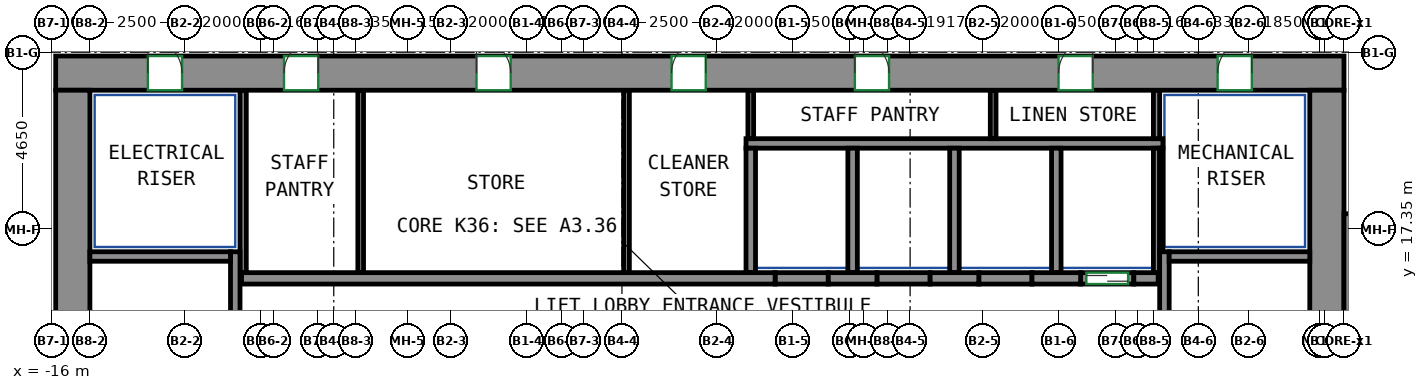
"""IFC4 building model, lengths in metres.
Left out: names, types, materials, properties, quantities, classifications, styles, units other than length and angle.
Written with IfcOpenShell. Run it as: python <this file> out.ifc"""

import sys

from ifc_helpers import new_model, si_unit, direction, frame, frame_2d, origin, place, context, subcontext, project, spatial, rectangle, extrude, source, transform, mapped, element, fill, save


model = new_model("IFC4")
c1 = context("Model", 3, precision=1e-05, world=origin(), true_north=direction((0.0, 1.0)))
c2 = subcontext(c1, "Body", "Model", "MODEL_VIEW")
j1 = project(units=[si_unit("LENGTHUNIT", "METRE"), si_unit("PLANEANGLEUNIT", "RADIAN")], contexts=[c1])
p1 = place(None, origin())
s1 = spatial("IfcSite", under=j1, at=p1, CompositionType="ELEMENT")
p2 = place(p1, origin())
s2 = spatial("IfcBuilding", under=s1, at=p2, CompositionType="ELEMENT")
p3 = place(p2, frame((0.0, 0.0, 154.1)))
s3 = spatial("IfcBuildingStorey", under=s2, at=p3, CompositionType="ELEMENT", Elevation=154.1)
m1 = source(origin(), c2, "Body", "SweptSolid", [
    extrude(rectangle(XDim=33.9, YDim=0.9, at=frame_2d((16.95, 0.0))), origin(), (0.0, 0.0, 1.0), 3.12),
])
p4 = place(p3, frame((-15.9, 21.45, 0.0), z_axis=(0.0, 0.0, 1.0), x_axis=(1.0, 0.0, 0.0)))
e1 = element("IfcWall", 1, at=p4, inside=s3, PredefinedType="SHEAR", context=c2, shape_type="MappedRepresentation", body=[
    mapped(m1, transform((0.0, 0.0, 0.0))),
])
p5 = place(p4, frame((6.008, 0.0, 0.0)))
e2 = element("IfcOpeningElement", 2, at=p5, cuts=e1, PredefinedType="OPENING", context=c2, shape_type="SweptSolid", body=[
    extrude(rectangle(XDim=0.9, YDim=2.1, at=frame_2d((0.45, 1.05))), frame((0.0, 0.46, 0.0), z_axis=(0.0, -1.0, 0.0), x_axis=(1.0, 0.0, 0.0)), (0.0, 0.0, 1.0), 0.92),
])
p6 = place(p4, frame((11.073, 0.0, 0.0)))
e3 = element("IfcOpeningElement", 3, at=p6, cuts=e1, PredefinedType="OPENING", context=c2, shape_type="SweptSolid", body=[
    extrude(rectangle(XDim=0.9, YDim=2.1, at=frame_2d((0.45, 1.05))), frame((0.0, 0.46, 0.0), z_axis=(0.0, -1.0, 0.0), x_axis=(1.0, 0.0, 0.0)), (0.0, 0.0, 1.0), 0.92),
])
p7 = place(p4, frame((16.205, 0.0, 0.0)))
e4 = element("IfcOpeningElement", 4, at=p7, cuts=e1, PredefinedType="OPENING", context=c2, shape_type="SweptSolid", body=[
    extrude(rectangle(XDim=0.9, YDim=2.1, at=frame_2d((0.45, 1.05))), frame((0.0, 0.46, 0.0), z_axis=(0.0, -1.0, 0.0), x_axis=(1.0, 0.0, 0.0)), (0.0, 0.0, 1.0), 0.92),
])
p8 = place(p4, frame((21.029, 0.0, 0.0)))
e5 = element("IfcOpeningElement", 5, at=p8, cuts=e1, PredefinedType="OPENING", context=c2, shape_type="SweptSolid", body=[
    extrude(rectangle(XDim=0.9, YDim=2.1, at=frame_2d((0.45, 1.05))), frame((0.0, 0.46, 0.0), z_axis=(0.0, -1.0, 0.0), x_axis=(1.0, 0.0, 0.0)), (0.0, 0.0, 1.0), 0.92),
])
p9 = place(p4, frame((26.389, 0.0, 0.0)))
e6 = element("IfcOpeningElement", 6, at=p9, cuts=e1, PredefinedType="OPENING", context=c2, shape_type="SweptSolid", body=[
    extrude(rectangle(XDim=0.9, YDim=2.1, at=frame_2d((0.45, 1.05))), frame((0.0, 0.46, 0.0), z_axis=(0.0, -1.0, 0.0), x_axis=(1.0, 0.0, 0.0)), (0.0, 0.0, 1.0), 0.92),
])
p10 = place(p4, frame((2.425, 0.0, 0.0)))
e7 = element("IfcOpeningElement", 7, at=p10, cuts=e1, PredefinedType="OPENING", context=c2, shape_type="SweptSolid", body=[
    extrude(rectangle(XDim=0.9, YDim=2.1, at=frame_2d((0.45, 1.05))), frame((0.0, 0.46, 0.0), z_axis=(0.0, -1.0, 0.0), x_axis=(1.0, 0.0, 0.0)), (0.0, 0.0, 1.0), 0.92),
])
p11 = place(p4, frame((30.575, 0.0, 0.0)))
e8 = element("IfcOpeningElement", 8, at=p11, cuts=e1, PredefinedType="OPENING", context=c2, shape_type="SweptSolid", body=[
    extrude(rectangle(XDim=0.9, YDim=2.1, at=frame_2d((0.45, 1.05))), frame((0.0, 0.46, 0.0), z_axis=(0.0, -1.0, 0.0), x_axis=(1.0, 0.0, 0.0)), (0.0, 0.0, 1.0), 0.92),
])
m2 = source(origin(), c2, "Body", "SweptSolid", [
    extrude(rectangle(XDim=12.0, YDim=0.9, at=frame_2d((6.0, 0.0))), origin(), (0.0, 0.0, 1.0), 3.12),
])
for number, where, z_axis, x_axis in (
    (9, (-15.45, 9.0, 0.0), (0.0, 0.0, 1.0), (0.0, 1.0, 0.0)),
    (10, (17.55, 9.0, 0.0), (0.0, 0.0, 1.0), (0.0, 1.0, 0.0)),
):
    element("IfcWall", number, at=place(p3, frame(where, z_axis=z_axis, x_axis=x_axis)), inside=s3, PredefinedType="SHEAR", context=c2, shape_type="MappedRepresentation", body=[
        mapped(m2, transform((0.0, 0.0, 0.0))),
    ])
m3 = source(origin(), c2, "Body", "SweptSolid", [
    extrude(rectangle(XDim=7.75, YDim=0.25, at=frame_2d((3.875, 0.0))), origin(), (0.0, 0.0, 1.0), 3.12),
])
p12 = place(p3, frame((-11.175, 9.0, 0.0), z_axis=(0.0, 0.0, 1.0), x_axis=(0.0, 1.0, 0.0)))
e11 = element("IfcWall", 11, at=p12, inside=s3, PredefinedType="SHEAR", context=c2, shape_type="MappedRepresentation", body=[
    mapped(m3, transform((0.0, 0.0, 0.0))),
])
m4 = source(origin(), c2, "Body", "SweptSolid", [
    extrude(rectangle(XDim=3.7, YDim=0.25, at=frame_2d((1.85, 0.0))), origin(), (0.0, 0.0, 1.0), 3.12),
])
p13 = place(p3, frame((-15.0, 16.625, 0.0), z_axis=(0.0, 0.0, 1.0), x_axis=(1.0, 0.0, 0.0)))
e12 = element("IfcWall", 12, at=p13, inside=s3, PredefinedType="SHEAR", context=c2, shape_type="MappedRepresentation", body=[
    mapped(m4, transform((0.0, 0.0, 0.0))),
])
p14 = place(p3, frame((13.275, 9.0, 0.0), z_axis=(0.0, 0.0, 1.0), x_axis=(0.0, 1.0, 0.0)))
e13 = element("IfcWall", 13, at=p14, inside=s3, PredefinedType="SHEAR", context=c2, shape_type="MappedRepresentation", body=[
    mapped(m3, transform((0.0, 0.0, 0.0))),
])
m5 = source(origin(), c2, "Body", "SweptSolid", [
    extrude(rectangle(XDim=3.7, YDim=0.25, at=frame_2d((1.85, 0.0))), origin(), (0.0, 0.0, 1.0), 3.12),
])
p15 = place(p3, frame((13.4, 16.625, 0.0), z_axis=(0.0, 0.0, 1.0), x_axis=(1.0, 0.0, 0.0)))
e14 = element("IfcWall", 14, at=p15, inside=s3, PredefinedType="SHEAR", context=c2, shape_type="MappedRepresentation", body=[
    mapped(m5, transform((0.0, 0.0, 0.0))),
])
m6 = source(origin(), c2, "Body", "SweptSolid", [
    extrude(rectangle(XDim=8.0, YDim=0.35, at=frame_2d((4.0, 0.0))), origin(), (0.0, 0.0, 1.0), 3.12),
])
p16 = place(p3, frame((18.175, 9.75, 0.0), z_axis=(0.0, 0.0, 1.0), x_axis=(0.0, 1.0, 0.0)))
e15 = element("IfcWall", 15, at=p16, inside=s3, PredefinedType="SHEAR", context=c2, shape_type="MappedRepresentation", body=[
    mapped(m6, transform((0.0, 0.0, 0.0))),
])
m7 = source(origin(), c2, "Body", "SweptSolid", [
    extrude(rectangle(XDim=14.04, YDim=0.3, at=frame_2d((7.02, 0.0))), origin(), (0.0, 0.0, 1.0), 3.12),
])
p17 = place(p3, frame((-11.01, 16.05, 0.0), z_axis=(0.0, 0.0, 1.0), x_axis=(1.0, 0.0, 0.0)))
e16 = element("IfcWall", 16, at=p17, inside=s3, PredefinedType="SHEAR", context=c2, shape_type="MappedRepresentation", body=[
    mapped(m7, transform((0.0, 0.0, 0.0))),
])
m8 = source(origin(), c2, "Body", "SweptSolid", [
    extrude(rectangle(XDim=1.28, YDim=0.3, at=frame_2d((0.64, 0.0))), origin(), (0.0, 0.0, 1.0), 3.12),
])
p18 = place(p3, frame((4.43, 16.05, 0.0), z_axis=(0.0, 0.0, 1.0), x_axis=(1.0, 0.0, 0.0)))
e17 = element("IfcWall", 17, at=p18, inside=s3, PredefinedType="SHEAR", context=c2, shape_type="MappedRepresentation", body=[
    mapped(m8, transform((0.0, 0.0, 0.0))),
])
m9 = source(origin(), c2, "Body", "SweptSolid", [
    extrude(rectangle(XDim=1.28, YDim=0.3, at=frame_2d((0.64, 0.0))), origin(), (0.0, 0.0, 1.0), 3.12),
])
p19 = place(p3, frame((7.11, 16.05, 0.0), z_axis=(0.0, 0.0, 1.0), x_axis=(1.0, 0.0, 0.0)))
e18 = element("IfcWall", 18, at=p19, inside=s3, PredefinedType="SHEAR", context=c2, shape_type="MappedRepresentation", body=[
    mapped(m9, transform((0.0, 0.0, 0.0))),
])
p20 = place(p3, frame((9.79, 16.05, 0.0), z_axis=(0.0, 0.0, 1.0), x_axis=(1.0, 0.0, 0.0)))
e19 = element("IfcWall", 19, at=p20, inside=s3, PredefinedType="SHEAR", context=c2, shape_type="MappedRepresentation", body=[
    mapped(m8, transform((0.0, 0.0, 0.0))),
])
m10 = source(origin(), c2, "Body", "SweptSolid", [
    extrude(rectangle(XDim=0.64, YDim=0.3, at=frame_2d((0.32, 0.0))), origin(), (0.0, 0.0, 1.0), 3.12),
])
p21 = place(p3, frame((12.47, 16.05, 0.0), z_axis=(0.0, 0.0, 1.0), x_axis=(1.0, 0.0, 0.0)))
e20 = element("IfcWall", 20, at=p21, inside=s3, PredefinedType="SHEAR", context=c2, shape_type="MappedRepresentation", body=[
    mapped(m10, transform((0.0, 0.0, 0.0))),
])
m11 = source(origin(), c2, "Body", "SweptSolid", [
    extrude(rectangle(XDim=1.4, YDim=0.3, at=frame_2d((0.7, 0.0))), origin(), (0.0, 0.0, 1.0), 3.12),
])
p22 = place(p3, frame((11.07, 16.05, 0.0), z_axis=(0.0, 0.0, 1.0), x_axis=(1.0, 0.0, 0.0)))
e21 = element("IfcWall", 21, at=p22, inside=s3, PredefinedType="PARTITIONING", context=c2, shape_type="MappedRepresentation", body=[
    mapped(m11, transform((0.0, 0.0, 0.0))),
])
p23 = place(p22, frame((0.15, 0.0, 0.0)))
e22 = element("IfcOpeningElement", 22, at=p23, cuts=e21, PredefinedType="OPENING", context=c2, shape_type="SweptSolid", body=[
    extrude(rectangle(XDim=1.1, YDim=2.1, at=frame_2d((0.55, 1.05))), frame((0.0, 0.16, 0.0), z_axis=(0.0, -1.0, 0.0), x_axis=(1.0, 0.0, 0.0)), (0.0, 0.0, 1.0), 0.32),
])
p24 = place(p3, frame((3.03, 16.05, 0.0), z_axis=(0.0, 0.0, 1.0), x_axis=(1.0, 0.0, 0.0)))
e23 = element("IfcWall", 23, at=p24, inside=s3, PredefinedType="PARTITIONING", context=c2, shape_type="MappedRepresentation", body=[
    mapped(m11, transform((0.0, 0.0, 0.0))),
])
m12 = source(origin(), c2, "Body", "SweptSolid", [
    extrude(rectangle(XDim=1.4, YDim=0.3, at=frame_2d((0.7, 0.0))), origin(), (0.0, 0.0, 1.0), 3.12),
])
for number, where, z_axis, x_axis in (
    (24, (5.71, 16.05, 0.0), (0.0, 0.0, 1.0), (1.0, 0.0, 0.0)),
    (25, (8.39, 16.05, 0.0), (0.0, 0.0, 1.0), (1.0, 0.0, 0.0)),
):
    element("IfcWall", number, at=place(p3, frame(where, z_axis=z_axis, x_axis=x_axis)), inside=s3, PredefinedType="PARTITIONING", context=c2, shape_type="MappedRepresentation", body=[
        mapped(m12, transform((0.0, 0.0, 0.0))),
    ])
m13 = source(origin(), c2, "Body", "SweptSolid", [
    extrude(rectangle(XDim=10.97, YDim=0.25, at=frame_2d((5.485, 0.0))), origin(), (0.0, 0.0, 1.0), 3.12),
])
p25 = place(p3, frame((2.265, 19.6, 0.0), z_axis=(0.0, 0.0, 1.0), x_axis=(1.0, 0.0, 0.0)))
e26 = element("IfcWall", 26, at=p25, inside=s3, PredefinedType="PARTITIONING", context=c2, shape_type="MappedRepresentation", body=[
    mapped(m13, transform((0.0, 0.0, 0.0))),
])
m14 = source(origin(), c2, "Body", "SweptSolid", [
    extrude(rectangle(XDim=3.275, YDim=0.165, at=frame_2d((1.638, 0.0))), origin(), (0.0, 0.0, 1.0), 3.12),
])
p26 = place(p3, frame((13.067, 16.2, 0.0), z_axis=(0.0, 0.0, 1.0), x_axis=(0.0, 1.0, 0.0)))
e27 = element("IfcWall", 27, at=p26, inside=s3, PredefinedType="PARTITIONING", context=c2, shape_type="MappedRepresentation", body=[
    mapped(m14, transform((0.0, 0.0, 0.0))),
])
m15 = source(origin(), c2, "Body", "SweptSolid", [
    extrude(rectangle(XDim=1.275, YDim=0.165, at=frame_2d((0.637, 0.0))), origin(), (0.0, 0.0, 1.0), 3.12),
])
p27 = place(p3, frame((13.067, 19.725, 0.0), z_axis=(0.0, 0.0, 1.0), x_axis=(0.0, 1.0, 0.0)))
e28 = element("IfcWall", 28, at=p27, inside=s3, PredefinedType="PARTITIONING", context=c2, shape_type="MappedRepresentation", body=[
    mapped(m15, transform((0.0, 0.0, 0.0))),
])
m16 = source(origin(), c2, "Body", "SweptSolid", [
    extrude(rectangle(XDim=4.8, YDim=0.165, at=frame_2d((2.4, 0.0))), origin(), (0.0, 0.0, 1.0), 3.12),
])
p28 = place(p3, frame((-10.968, 16.2, 0.0), z_axis=(0.0, 0.0, 1.0), x_axis=(0.0, 1.0, 0.0)))
e29 = element("IfcWall", 29, at=p28, inside=s3, PredefinedType="PARTITIONING", context=c2, shape_type="MappedRepresentation", body=[
    mapped(m16, transform((0.0, 0.0, 0.0))),
])
m17 = source(origin(), c2, "Body", "SweptSolid", [
    extrude(rectangle(XDim=3.275, YDim=0.25, at=frame_2d((1.638, 0.0))), origin(), (0.0, 0.0, 1.0), 3.12),
])
p29 = place(p3, frame((10.43, 16.2, 0.0), z_axis=(0.0, 0.0, 1.0), x_axis=(0.0, 1.0, 0.0)))
e30 = element("IfcWall", 30, at=p29, inside=s3, PredefinedType="PARTITIONING", context=c2, shape_type="MappedRepresentation", body=[
    mapped(m17, transform((0.0, 0.0, 0.0))),
])
m18 = source(origin(), c2, "Body", "SweptSolid", [
    extrude(rectangle(XDim=2.725, YDim=0.085, at=frame_2d((1.363, 0.0))), origin(), (0.0, 0.0, 1.0), 3.12),
])
p30 = place(p3, frame((13.192, 16.75, 0.0), z_axis=(0.0, 0.0, 1.0), x_axis=(0.0, 1.0, 0.0)))
e31 = element("IfcWall", 31, at=p30, inside=s3, PredefinedType="PARTITIONING", context=c2, shape_type="MappedRepresentation", body=[
    mapped(m18, transform((0.0, 0.0, 0.0))),
])
for number, where, z_axis, x_axis in (
    (32, (2.39, 16.2, 0.0), (0.0, 0.0, 1.0), (0.0, 1.0, 0.0)),
    (33, (5.07, 16.2, 0.0), (0.0, 0.0, 1.0), (0.0, 1.0, 0.0)),
    (34, (7.75, 16.2, 0.0), (0.0, 0.0, 1.0), (0.0, 1.0, 0.0)),
):
    element("IfcWall", number, at=place(p3, frame(where, z_axis=z_axis, x_axis=x_axis)), inside=s3, PredefinedType="PARTITIONING", context=c2, shape_type="MappedRepresentation", body=[
        mapped(m17, transform((0.0, 0.0, 0.0))),
    ])
m19 = source(origin(), c2, "Body", "SweptSolid", [
    extrude(rectangle(XDim=4.8, YDim=0.15, at=frame_2d((2.4, 0.0))), origin(), (0.0, 0.0, 1.0), 3.12),
])
for number, where, z_axis, x_axis in (
    (35, (-7.875, 16.2, 0.0), (0.0, 0.0, 1.0), (0.0, 1.0, 0.0)),
    (36, (-0.88, 16.2, 0.0), (0.0, 0.0, 1.0), (0.0, 1.0, 0.0)),
):
    element("IfcWall", number, at=place(p3, frame(where, z_axis=z_axis, x_axis=x_axis)), inside=s3, PredefinedType="PARTITIONING", context=c2, shape_type="MappedRepresentation", body=[
        mapped(m19, transform((0.0, 0.0, 0.0))),
    ])
m20 = source(origin(), c2, "Body", "SweptSolid", [
    extrude(rectangle(XDim=1.275, YDim=0.15, at=frame_2d((0.637, 0.0))), origin(), (0.0, 0.0, 1.0), 3.12),
])
for number, where, z_axis, x_axis in (
    (37, (2.39, 19.725, 0.0), (0.0, 0.0, 1.0), (0.0, 1.0, 0.0)),
    (38, (8.768, 19.725, 0.0), (0.0, 0.0, 1.0), (0.0, 1.0, 0.0)),
):
    element("IfcWall", number, at=place(p3, frame(where, z_axis=z_axis, x_axis=x_axis)), inside=s3, PredefinedType="PARTITIONING", context=c2, shape_type="MappedRepresentation", body=[
        mapped(m20, transform((0.0, 0.0, 0.0))),
    ])
p31 = place(p23, origin())
e39 = element("IfcDoor", 39, at=p31, inside=s3, OperationType="DOUBLE_DOOR_SLIDING", PredefinedType="DOOR", context=c2, shape_type="SweptSolid", body=[
    extrude(rectangle(XDim=1.1, YDim=2.1, at=frame_2d((0.55, 1.05))), frame((0.0, 0.025, 0.0), z_axis=(0.0, -1.0, 0.0), x_axis=(1.0, 0.0, 0.0)), (0.0, 0.0, 1.0), 0.05),
])
fill(e22, e39)
p32 = place(p5, origin())
e40 = element("IfcDoor", 40, at=p32, inside=s3, OperationType="SINGLE_SWING_RIGHT", PredefinedType="DOOR", context=c2, shape_type="SweptSolid", body=[
    extrude(rectangle(XDim=0.9, YDim=2.1, at=frame_2d((0.45, 1.05))), frame((0.0, -0.305, 0.0), z_axis=(0.0, -1.0, 0.0), x_axis=(1.0, 0.0, 0.0)), (0.0, 0.0, 1.0), 0.05),
])
fill(e2, e40)
p33 = place(p6, origin())
e41 = element("IfcDoor", 41, at=p33, inside=s3, OperationType="SINGLE_SWING_LEFT", PredefinedType="DOOR", context=c2, shape_type="SweptSolid", body=[
    extrude(rectangle(XDim=0.9, YDim=2.1, at=frame_2d((0.45, 1.05))), frame((0.0, -0.305, 0.0), z_axis=(0.0, -1.0, 0.0), x_axis=(1.0, 0.0, 0.0)), (0.0, 0.0, 1.0), 0.05),
])
fill(e3, e41)
p34 = place(p7, origin())
e42 = element("IfcDoor", 42, at=p34, inside=s3, OperationType="SINGLE_SWING_RIGHT", PredefinedType="DOOR", context=c2, shape_type="SweptSolid", body=[
    extrude(rectangle(XDim=0.9, YDim=2.1, at=frame_2d((0.45, 1.05))), frame((0.0, -0.305, 0.0), z_axis=(0.0, -1.0, 0.0), x_axis=(1.0, 0.0, 0.0)), (0.0, 0.0, 1.0), 0.05),
])
fill(e4, e42)
p35 = place(p8, origin())
e43 = element("IfcDoor", 43, at=p35, inside=s3, OperationType="SINGLE_SWING_LEFT", PredefinedType="DOOR", context=c2, shape_type="SweptSolid", body=[
    extrude(rectangle(XDim=0.9, YDim=2.1, at=frame_2d((0.45, 1.05))), frame((0.0, -0.305, 0.0), z_axis=(0.0, -1.0, 0.0), x_axis=(1.0, 0.0, 0.0)), (0.0, 0.0, 1.0), 0.05),
])
fill(e5, e43)
p36 = place(p9, origin())
e44 = element("IfcDoor", 44, at=p36, inside=s3, OperationType="SINGLE_SWING_RIGHT", PredefinedType="DOOR", context=c2, shape_type="SweptSolid", body=[
    extrude(rectangle(XDim=0.9, YDim=2.1, at=frame_2d((0.45, 1.05))), frame((0.0, -0.305, 0.0), z_axis=(0.0, -1.0, 0.0), x_axis=(1.0, 0.0, 0.0)), (0.0, 0.0, 1.0), 0.05),
])
fill(e6, e44)
p37 = place(p10, origin())
e45 = element("IfcDoor", 45, at=p37, inside=s3, OperationType="SINGLE_SWING_LEFT", PredefinedType="DOOR", context=c2, shape_type="SweptSolid", body=[
    extrude(rectangle(XDim=0.9, YDim=2.1, at=frame_2d((0.45, 1.05))), frame((0.0, -0.305, 0.0), z_axis=(0.0, -1.0, 0.0), x_axis=(1.0, 0.0, 0.0)), (0.0, 0.0, 1.0), 0.05),
])
fill(e7, e45)
p38 = place(p11, origin())
e46 = element("IfcDoor", 46, at=p38, inside=s3, OperationType="SINGLE_SWING_RIGHT", PredefinedType="DOOR", context=c2, shape_type="SweptSolid", body=[
    extrude(rectangle(XDim=0.9, YDim=2.1, at=frame_2d((0.45, 1.05))), frame((0.0, -0.305, 0.0), z_axis=(0.0, -1.0, 0.0), x_axis=(1.0, 0.0, 0.0)), (0.0, 0.0, 1.0), 0.05),
])
fill(e8, e46)
save(model, sys.argv[1])
